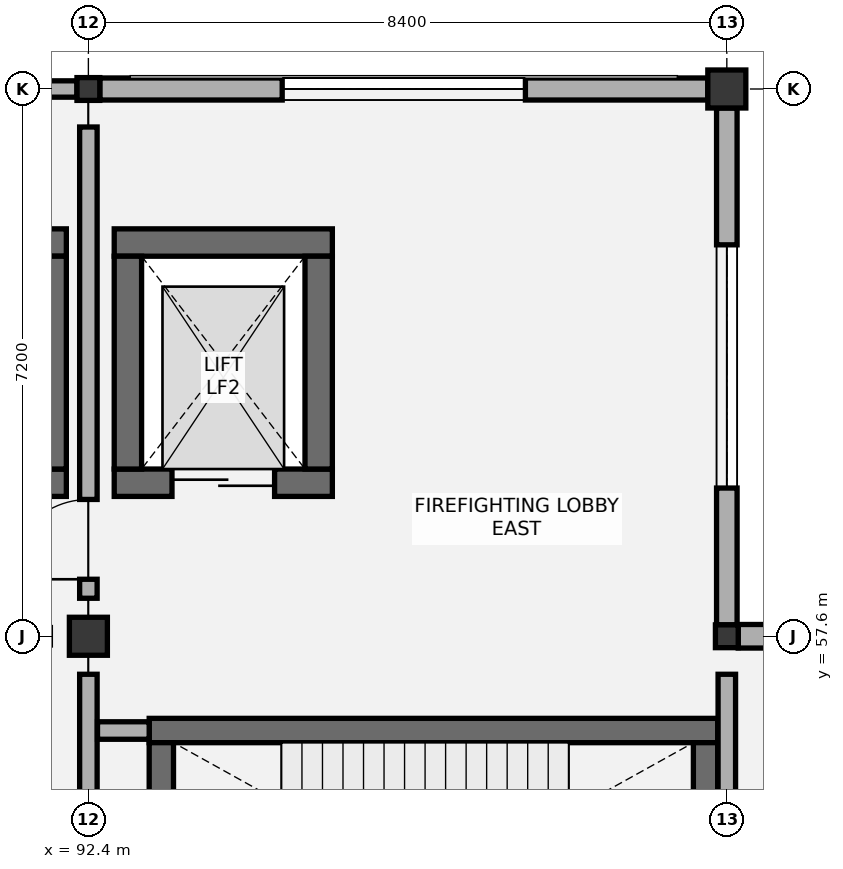
"""IFC4 building model, lengths in metres.
Left out: names, types, materials, properties, quantities, classifications, styles, units other than length and angle.
Written with IfcOpenShell. Run it as: python <this file> out.ifc"""

import sys

from ifc_helpers import new_model, si_unit, direction, frame, frame_2d, origin, origin_2d, place, context, subcontext, project, spatial, rectangle, i_section, extrude, element, fill, save


model = new_model("IFC4")
c1 = context("Model", 3, precision=1e-05, world=origin(), true_north=direction((0.0, 1.0)))
c2 = subcontext(c1, "Body", "Model", "MODEL_VIEW")
j1 = project(units=[si_unit("LENGTHUNIT", "METRE"), si_unit("PLANEANGLEUNIT", "RADIAN")], contexts=[c1])
p1 = place(None, origin())
s1 = spatial("IfcSite", under=j1, at=p1, CompositionType="ELEMENT")
p2 = place(p1, origin())
s2 = spatial("IfcBuilding", under=s1, at=p2, CompositionType="ELEMENT")
p3 = place(p2, frame((0.0, 0.0, 69.0)))
s3 = spatial("IfcBuildingStorey", under=s2, at=p3, CompositionType="ELEMENT", Elevation=69.0)
p4 = place(p3, frame((92.4, 57.6, 0.0), z_axis=(0.0, 0.0, 1.0), x_axis=(1.0, 0.0, 0.0)))
e1 = element("IfcColumn", 1, at=p4, inside=s3, PredefinedType="COLUMN", context=c2, shape_type="SweptSolid", body=[
    extrude(rectangle(XDim=0.5, YDim=0.5, at=origin_2d()), origin(), (0.0, 0.0, 1.0), 4.8),
])
for number, where, z_axis, x_axis in (
    (2, (92.4, 64.8, 0.0), (0.0, 0.0, 1.0), (1.0, 0.0, 0.0)),
    (3, (100.8, 57.6, 0.0), (0.0, 0.0, 1.0), (1.0, 0.0, 0.0)),
):
    element("IfcColumn", number, at=place(p3, frame(where, z_axis=z_axis, x_axis=x_axis)), inside=s3, PredefinedType="COLUMN", context=c2, shape_type="SweptSolid", body=[
        extrude(i_section(OverallWidth=0.3, OverallDepth=0.3, WebThickness=0.011, FlangeThickness=0.019, FilletRadius=0.027, at=origin_2d()), origin(), (0.0, 0.0, 1.0), 4.8),
    ])
p5 = place(p3, frame((100.8, 64.8, 0.0), z_axis=(0.0, 0.0, 1.0), x_axis=(1.0, 0.0, 0.0)))
e4 = element("IfcColumn", 4, at=p5, inside=s3, PredefinedType="COLUMN", context=c2, shape_type="SweptSolid", body=[
    extrude(rectangle(XDim=0.5, YDim=0.5, at=origin_2d()), origin(), (0.0, 0.0, 1.0), 4.8),
])
p6 = place(p3, frame((93.2, 56.36, 0.0), z_axis=(0.0, 0.0, 1.0), x_axis=(1.0, 0.0, 0.0)))
e5 = element("IfcWall", 5, at=p6, inside=s3, PredefinedType="SHEAR", context=c2, shape_type="SweptSolid", body=[
    extrude(rectangle(XDim=7.48, YDim=0.32, at=frame_2d((3.74, 0.0))), origin(), (0.0, 0.0, 1.0), 4.6),
])
for number, where, z_axis, x_axis in (
    (6, (93.36, 52.4, 0.0), (0.0, 0.0, 1.0), (0.0, 1.0, 0.0)),
    (7, (100.52, 52.4, 0.0), (0.0, 0.0, 1.0), (0.0, 1.0, 0.0)),
):
    element("IfcWall", number, at=place(p3, frame(where, z_axis=z_axis, x_axis=x_axis)), inside=s3, PredefinedType="SHEAR", context=c2, shape_type="SweptSolid", body=[
        extrude(rectangle(XDim=3.8, YDim=0.32, at=frame_2d((1.9, 0.0))), origin(), (0.0, 0.0, 1.0), 4.6),
    ])
p7 = place(p3, frame((84.34, 62.78, 0.0), z_axis=(0.0, 0.0, 1.0), x_axis=(1.0, 0.0, 0.0)))
e8 = element("IfcWall", 8, at=p7, inside=s3, PredefinedType="SHEAR", context=c2, shape_type="SweptSolid", body=[
    extrude(rectangle(XDim=7.77, YDim=0.36, at=frame_2d((3.885, 0.0))), origin(), (0.0, 0.0, 1.0), 5.9),
])
p8 = place(p3, frame((89.45, 59.62, 0.0), z_axis=(0.0, 0.0, 1.0), x_axis=(1.0, 0.0, 0.0)))
e9 = element("IfcWall", 9, at=p8, inside=s3, PredefinedType="SHEAR", context=c2, shape_type="SweptSolid", body=[
    extrude(rectangle(XDim=2.66, YDim=0.36, at=frame_2d((1.33, 0.0))), origin(), (0.0, 0.0, 1.0), 5.9),
])
p9 = place(p8, frame((0.78, 0.0, 0.0)))
e10 = element("IfcOpeningElement", 10, at=p9, cuts=e9, PredefinedType="OPENING", context=c2, shape_type="SweptSolid", body=[
    extrude(rectangle(XDim=1.1, YDim=2.15, at=frame_2d((0.55, 1.075))), frame((0.0, 0.19, 0.0), z_axis=(0.0, -1.0, 0.0), x_axis=(1.0, 0.0, 0.0)), (0.0, 0.0, 1.0), 0.38),
])
p10 = place(p3, frame((91.93, 59.8, 0.0), z_axis=(0.0, 0.0, 1.0), x_axis=(0.0, 1.0, 0.0)))
e11 = element("IfcWall", 11, at=p10, inside=s3, PredefinedType="SHEAR", context=c2, shape_type="SweptSolid", body=[
    extrude(rectangle(XDim=2.8, YDim=0.36, at=frame_2d((1.4, 0.0))), origin(), (0.0, 0.0, 1.0), 5.9),
])
p11 = place(p3, frame((92.74, 62.78, 0.0), z_axis=(0.0, 0.0, 1.0), x_axis=(1.0, 0.0, 0.0)))
e12 = element("IfcWall", 12, at=p11, inside=s3, PredefinedType="SHEAR", context=c2, shape_type="SweptSolid", body=[
    extrude(rectangle(XDim=2.87, YDim=0.36, at=frame_2d((1.435, 0.0))), origin(), (0.0, 0.0, 1.0), 5.9),
])
p12 = place(p3, frame((92.74, 59.62, 0.0), z_axis=(0.0, 0.0, 1.0), x_axis=(1.0, 0.0, 0.0)))
e13 = element("IfcWall", 13, at=p12, inside=s3, PredefinedType="SHEAR", context=c2, shape_type="SweptSolid", body=[
    extrude(rectangle(XDim=2.87, YDim=0.36, at=frame_2d((1.435, 0.0))), origin(), (0.0, 0.0, 1.0), 5.9),
])
p13 = place(p12, frame((0.76, 0.0, 0.0)))
e14 = element("IfcOpeningElement", 14, at=p13, cuts=e13, PredefinedType="OPENING", context=c2, shape_type="SweptSolid", body=[
    extrude(rectangle(XDim=1.35, YDim=2.2, at=frame_2d((0.675, 1.1))), frame((0.0, 0.19, 0.0), z_axis=(0.0, -1.0, 0.0), x_axis=(1.0, 0.0, 0.0)), (0.0, 0.0, 1.0), 0.38),
])
for number, where, z_axis, x_axis in (
    (15, (92.92, 59.8, 0.0), (0.0, 0.0, 1.0), (0.0, 1.0, 0.0)),
    (16, (95.43, 59.8, 0.0), (0.0, 0.0, 1.0), (0.0, 1.0, 0.0)),
):
    element("IfcWall", number, at=place(p3, frame(where, z_axis=z_axis, x_axis=x_axis)), inside=s3, PredefinedType="SHEAR", context=c2, shape_type="SweptSolid", body=[
        extrude(rectangle(XDim=2.8, YDim=0.36, at=frame_2d((1.4, 0.0))), origin(), (0.0, 0.0, 1.0), 5.9),
    ])
p14 = place(p3, frame((84.25, 64.8, 0.0), z_axis=(0.0, 0.0, 1.0), x_axis=(1.0, 0.0, 0.0)))
e17 = element("IfcWall", 17, at=p14, inside=s3, PredefinedType="SOLIDWALL", context=c2, shape_type="SweptSolid", body=[
    extrude(rectangle(XDim=8.0, YDim=0.215, at=frame_2d((4.0, 0.0))), origin(), (0.0, 0.0, 1.0), 4.365),
])
p15 = place(p14, frame((2.4, 0.0, 1.45)))
e18 = element("IfcOpeningElement", 18, at=p15, cuts=e17, PredefinedType="OPENING", context=c2, shape_type="SweptSolid", body=[
    extrude(rectangle(XDim=3.2, YDim=1.2, at=frame_2d((1.6, 0.6))), frame((0.0, 0.117, 0.0), z_axis=(0.0, -1.0, 0.0), x_axis=(1.0, 0.0, 0.0)), (0.0, 0.0, 1.0), 0.235),
])
p16 = place(p3, frame((92.55, 64.8, 0.0), z_axis=(0.0, 0.0, 1.0), x_axis=(1.0, 0.0, 0.0)))
e19 = element("IfcWall", 19, at=p16, inside=s3, PredefinedType="SOLIDWALL", context=c2, shape_type="SweptSolid", body=[
    extrude(rectangle(XDim=8.0, YDim=0.29, at=frame_2d((4.0, 0.0))), origin(), (0.0, 0.0, 1.0), 4.365),
])
p17 = place(p16, frame((2.4, 0.0, 1.45)))
e20 = element("IfcOpeningElement", 20, at=p17, cuts=e19, PredefinedType="OPENING", context=c2, shape_type="SweptSolid", body=[
    extrude(rectangle(XDim=3.2, YDim=1.2, at=frame_2d((1.6, 0.6))), frame((0.0, 0.155, 0.0), z_axis=(0.0, -1.0, 0.0), x_axis=(1.0, 0.0, 0.0)), (0.0, 0.0, 1.0), 0.31),
])
p18 = place(p3, frame((100.8, 57.75, 0.0), z_axis=(0.0, 0.0, 1.0), x_axis=(0.0, 1.0, 0.0)))
e21 = element("IfcWall", 21, at=p18, inside=s3, PredefinedType="SOLIDWALL", context=c2, shape_type="SweptSolid", body=[
    extrude(rectangle(XDim=6.8, YDim=0.27, at=frame_2d((3.4, 0.0))), origin(), (0.0, 0.0, 1.0), 4.045),
])
p19 = place(p18, frame((1.8, 0.0, 1.45)))
e22 = element("IfcOpeningElement", 22, at=p19, cuts=e21, PredefinedType="OPENING", context=c2, shape_type="SweptSolid", body=[
    extrude(rectangle(XDim=3.2, YDim=1.2, at=frame_2d((1.6, 0.6))), frame((0.0, 0.145, 0.0), z_axis=(0.0, -1.0, 0.0), x_axis=(1.0, 0.0, 0.0)), (0.0, 0.0, 1.0), 0.29),
])
p20 = place(p3, frame((100.95, 57.6, 0.0), z_axis=(0.0, 0.0, 1.0), x_axis=(1.0, 0.0, 0.0)))
e23 = element("IfcWall", 23, at=p20, inside=s3, PredefinedType="SOLIDWALL", context=c2, shape_type="SweptSolid", body=[
    extrude(rectangle(XDim=8.0, YDim=0.31, at=frame_2d((4.0, 0.0))), origin(), (0.0, 0.0, 1.0), 4.365),
])
p21 = place(p20, frame((0.933, 0.0, 1.45)))
e24 = element("IfcOpeningElement", 24, at=p21, cuts=e23, PredefinedType="OPENING", context=c2, shape_type="SweptSolid", body=[
    extrude(rectangle(XDim=2.6, YDim=1.2, at=frame_2d((1.3, 0.6))), frame((0.0, 0.165, 0.0), z_axis=(0.0, -1.0, 0.0), x_axis=(1.0, 0.0, 0.0)), (0.0, 0.0, 1.0), 0.33),
])
p22 = place(p20, frame((4.467, 0.0, 1.45)))
e25 = element("IfcOpeningElement", 25, at=p22, cuts=e23, PredefinedType="OPENING", context=c2, shape_type="SweptSolid", body=[
    extrude(rectangle(XDim=2.6, YDim=1.2, at=frame_2d((1.3, 0.6))), frame((0.0, 0.165, 0.0), z_axis=(0.0, -1.0, 0.0), x_axis=(1.0, 0.0, 0.0)), (0.0, 0.0, 1.0), 0.33),
])
p23 = place(p3, frame((100.92, 64.8, 0.0), z_axis=(0.0, 0.0, 1.0), x_axis=(1.0, 0.0, 0.0)))
e26 = element("IfcWall", 26, at=p23, inside=s3, PredefinedType="PARAPET", context=c2, shape_type="SweptSolid", body=[
    extrude(rectangle(XDim=8.16, YDim=0.185, at=frame_2d((4.08, 0.0))), origin(), (0.0, 0.0, 1.0), 1.15),
])
p24 = place(p3, frame((92.4, 50.9, 0.0), z_axis=(0.0, 0.0, 1.0), x_axis=(0.0, 1.0, 0.0)))
e27 = element("IfcWall", 27, at=p24, inside=s3, PredefinedType="PARTITIONING", context=c2, shape_type="SweptSolid", body=[
    extrude(rectangle(XDim=6.2, YDim=0.23, at=frame_2d((3.1, 0.0))), origin(), (0.0, 0.0, 1.0), 4.095),
])
p25 = place(p24, frame((0.05, 0.0, 0.0)))
e28 = element("IfcOpeningElement", 28, at=p25, cuts=e27, PredefinedType="OPENING", context=c2, shape_type="SweptSolid", body=[
    extrude(rectangle(XDim=1.05, YDim=2.15, at=frame_2d((0.525, 1.075))), frame((0.0, 0.125, 0.0), z_axis=(0.0, -1.0, 0.0), x_axis=(1.0, 0.0, 0.0)), (0.0, 0.0, 1.0), 0.25),
])
p26 = place(p3, frame((92.4, 58.1, 0.0), z_axis=(0.0, 0.0, 1.0), x_axis=(0.0, 1.0, 0.0)))
e29 = element("IfcWall", 29, at=p26, inside=s3, PredefinedType="PARTITIONING", context=c2, shape_type="SweptSolid", body=[
    extrude(rectangle(XDim=6.2, YDim=0.23, at=frame_2d((3.1, 0.0))), origin(), (0.0, 0.0, 1.0), 4.095),
])
p27 = place(p26, frame((0.25, 0.0, 0.0)))
e30 = element("IfcOpeningElement", 30, at=p27, cuts=e29, PredefinedType="OPENING", context=c2, shape_type="SweptSolid", body=[
    extrude(rectangle(XDim=1.05, YDim=2.15, at=frame_2d((0.525, 1.075))), frame((0.0, 0.125, 0.0), z_axis=(0.0, -1.0, 0.0), x_axis=(1.0, 0.0, 0.0)), (0.0, 0.0, 1.0), 0.25),
])
p28 = place(p3, frame((100.8, 50.9, 0.0), z_axis=(0.0, 0.0, 1.0), x_axis=(0.0, 1.0, 0.0)))
e31 = element("IfcWall", 31, at=p28, inside=s3, PredefinedType="PARTITIONING", context=c2, shape_type="SweptSolid", body=[
    extrude(rectangle(XDim=6.2, YDim=0.23, at=frame_2d((3.1, 0.0))), origin(), (0.0, 0.0, 1.0), 4.095),
])
p29 = place(p3, frame((92.52, 56.36, 0.0), z_axis=(0.0, 0.0, 1.0), x_axis=(1.0, 0.0, 0.0)))
e32 = element("IfcWall", 32, at=p29, inside=s3, PredefinedType="PARTITIONING", context=c2, shape_type="SweptSolid", body=[
    extrude(rectangle(XDim=0.68, YDim=0.23, at=frame_2d((0.34, 0.0))), origin(), (0.0, 0.0, 1.0), 4.6),
])
p30 = place(p17, origin())
e33 = element("IfcWindow", 33, at=p30, inside=s3, PartitioningType="SINGLE_PANEL", PredefinedType="WINDOW", context=c2, shape_type="SweptSolid", body=[
    extrude(rectangle(XDim=3.2, YDim=1.2, at=frame_2d((1.6, 0.6))), frame((0.0, 0.03, 0.0), z_axis=(0.0, -1.0, 0.0), x_axis=(1.0, 0.0, 0.0)), (0.0, 0.0, 1.0), 0.06),
])
fill(e20, e33)
p31 = place(p19, origin())
e34 = element("IfcWindow", 34, at=p31, inside=s3, PartitioningType="SINGLE_PANEL", PredefinedType="WINDOW", context=c2, shape_type="SweptSolid", body=[
    extrude(rectangle(XDim=3.2, YDim=1.2, at=frame_2d((1.6, 0.6))), frame((0.0, 0.03, 0.0), z_axis=(0.0, -1.0, 0.0), x_axis=(1.0, 0.0, 0.0)), (0.0, 0.0, 1.0), 0.06),
])
fill(e22, e34)
p32 = place(p13, origin())
e35 = element("IfcDoor", 35, at=p32, inside=s3, OperationType="DOUBLE_DOOR_SLIDING", PredefinedType="DOOR", context=c2, shape_type="SweptSolid", body=[
    extrude(rectangle(XDim=1.35, YDim=2.2, at=frame_2d((0.675, 1.1))), frame((0.0, 0.025, 0.0), z_axis=(0.0, -1.0, 0.0), x_axis=(1.0, 0.0, 0.0)), (0.0, 0.0, 1.0), 0.05),
])
fill(e14, e35)
p33 = place(p27, origin())
e36 = element("IfcDoor", 36, at=p33, inside=s3, OperationType="SINGLE_SWING_LEFT", PredefinedType="DOOR", context=c2, shape_type="SweptSolid", body=[
    extrude(rectangle(XDim=1.05, YDim=2.15, at=frame_2d((0.525, 1.075))), frame((0.0, 0.025, 0.0), z_axis=(0.0, -1.0, 0.0), x_axis=(1.0, 0.0, 0.0)), (0.0, 0.0, 1.0), 0.05),
])
fill(e30, e36)
save(model, sys.argv[1])
